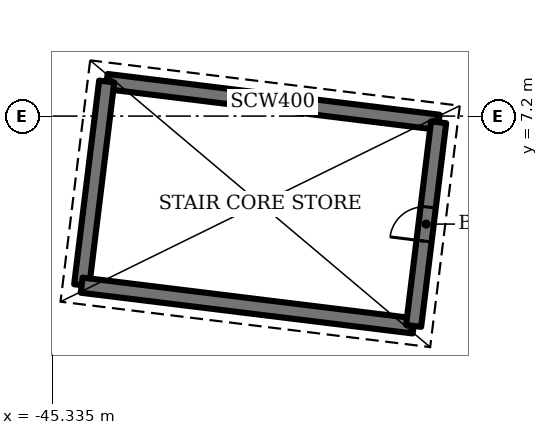
"""IFC4 building model, lengths in metres.
Left out: names, types, materials, properties, quantities, classifications, styles, units other than length and angle.
Written with IfcOpenShell. Run it as: python <this file> out.ifc"""

import sys

from ifc_helpers import new_model, si_unit, direction, frame, frame_2d, origin, place, context, subcontext, project, spatial, rectangle, extrude, element, fill, save


model = new_model("IFC4")
c1 = context("Model", 3, precision=1e-05, world=origin(), true_north=direction((0.0, 1.0)))
c2 = subcontext(c1, "Body", "Model", "MODEL_VIEW")
j1 = project(units=[si_unit("LENGTHUNIT", "METRE"), si_unit("PLANEANGLEUNIT", "RADIAN")], contexts=[c1])
p1 = place(None, origin())
s1 = spatial("IfcSite", under=j1, at=p1, CompositionType="ELEMENT")
p2 = place(p1, origin())
s2 = spatial("IfcBuilding", under=s1, at=p2, CompositionType="ELEMENT")
p3 = place(p2, frame((0.0, 0.0, -10.0)))
s3 = spatial("IfcBuildingStorey", under=s2, at=p3, CompositionType="ELEMENT", Elevation=-10.0)
p4 = place(p3, frame((-35.165, 7.038, 0.0), z_axis=(0.0, 0.0, 1.0), x_axis=(-0.992545280606, 0.121876437212, 0.0)))
e1 = element("IfcWall", 1, at=p4, inside=s3, PredefinedType="SHEAR", context=c2, shape_type="SweptSolid", body=[
    extrude(rectangle(XDim=8.8, YDim=0.4, at=frame_2d((4.4, 0.0))), origin(), (0.0, 0.0, 1.0), 4.5),
])
p5 = place(p3, frame((-43.899, 8.11, 0.0), z_axis=(0.0, 0.0, 1.0), x_axis=(-0.12184754212, -0.99254882826, 0.0)))
e2 = element("IfcWall", 2, at=p5, inside=s3, PredefinedType="SHEAR", context=c2, shape_type="SweptSolid", body=[
    extrude(rectangle(XDim=5.4, YDim=0.4, at=frame_2d((2.7, 0.0))), origin(), (0.0, 0.0, 1.0), 4.5),
])
p6 = place(p3, frame((-44.557, 2.751, 0.0), z_axis=(0.0, 0.0, 1.0), x_axis=(0.992545280606, -0.121876437212, 0.0)))
e3 = element("IfcWall", 3, at=p6, inside=s3, PredefinedType="SHEAR", context=c2, shape_type="SweptSolid", body=[
    extrude(rectangle(XDim=8.8, YDim=0.4, at=frame_2d((4.4, 0.0))), origin(), (0.0, 0.0, 1.0), 4.5),
])
p7 = place(p3, frame((-35.823, 1.678, 0.0), z_axis=(0.0, 0.0, 1.0), x_axis=(0.12184754212, 0.99254882826, 0.0)))
e4 = element("IfcWall", 4, at=p7, inside=s3, PredefinedType="SHEAR", context=c2, shape_type="SweptSolid", body=[
    extrude(rectangle(XDim=5.4, YDim=0.4, at=frame_2d((2.7, 0.0))), origin(), (0.0, 0.0, 1.0), 4.5),
])
p8 = place(p7, frame((2.25, 0.0, 0.0)))
e5 = element("IfcOpeningElement", 5, at=p8, cuts=e4, PredefinedType="OPENING", context=c2, shape_type="SweptSolid", body=[
    extrude(rectangle(XDim=0.9, YDim=2.1, at=frame_2d((0.45, 1.05))), frame((0.0, 0.21, 0.0), z_axis=(0.0, -1.0, 0.0), x_axis=(1.0, 0.0, 0.0)), (0.0, 0.0, 1.0), 0.42),
])
p9 = place(p8, origin())
e6 = element("IfcDoor", 6, at=p9, inside=s3, OperationType="SINGLE_SWING_LEFT", PredefinedType="DOOR", context=c2, shape_type="SweptSolid", body=[
    extrude(rectangle(XDim=0.9, YDim=2.1, at=frame_2d((0.45, 1.05))), frame((0.0, 0.025, 0.0), z_axis=(0.0, -1.0, 0.0), x_axis=(1.0, 0.0, 0.0)), (0.0, 0.0, 1.0), 0.05),
])
fill(e5, e6)
save(model, sys.argv[1])
